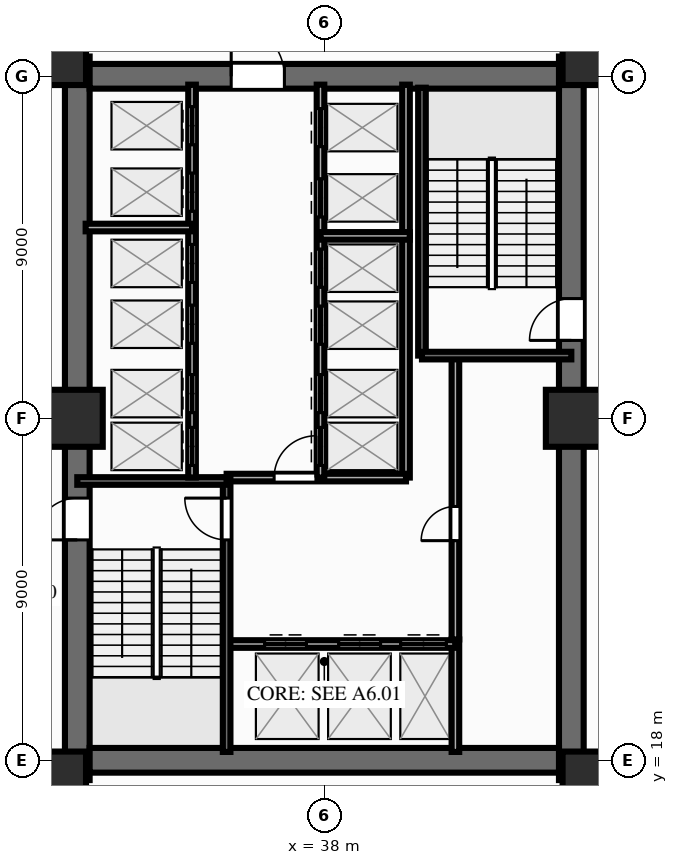
"""IFC4 building model, lengths in metres.
Left out: names, types, materials, properties, quantities, classifications, styles, units other than length and angle.
Written with IfcOpenShell. Run it as: python <this file> out.ifc"""

import sys

from ifc_helpers import new_model, si_unit, direction, frame, frame_2d, origin, origin_2d, place, context, subcontext, project, spatial, rectangle, extrude, source, transform, mapped, element, fill, save


model = new_model("IFC4")
c1 = context("Model", 3, precision=1e-05, world=origin(), true_north=direction((0.0, 1.0)))
c2 = subcontext(c1, "Body", "Model", "MODEL_VIEW")
j1 = project(units=[si_unit("LENGTHUNIT", "METRE"), si_unit("PLANEANGLEUNIT", "RADIAN")], contexts=[c1])
p1 = place(None, origin())
s1 = spatial("IfcSite", under=j1, at=p1, CompositionType="ELEMENT")
p2 = place(p1, origin())
s2 = spatial("IfcBuilding", under=s1, at=p2, CompositionType="ELEMENT")
p3 = place(p2, frame((0.0, 0.0, -9.2)))
s3 = spatial("IfcBuildingStorey", under=s2, at=p3, CompositionType="ELEMENT", Elevation=-9.2)
p4 = place(p3, frame((31.5, 17.48, 0.0), z_axis=(0.0, 0.0, 1.0), x_axis=(0.0, 1.0, 0.0)))
e1 = element("IfcWall", 1, at=p4, inside=s3, PredefinedType="SHEAR", context=c2, shape_type="SweptSolid", body=[
    extrude(rectangle(XDim=19.04, YDim=0.65, at=frame_2d((9.52, 0.0))), origin(), (0.0, 0.0, 1.0), 4.6),
])
p5 = place(p4, frame((6.32, 0.0, 0.0)))
e2 = element("IfcOpeningElement", 2, at=p5, cuts=e1, PredefinedType="OPENING", context=c2, shape_type="SweptSolid", body=[
    extrude(rectangle(XDim=1.1, YDim=2.15, at=frame_2d((0.55, 1.075))), frame((0.0, 0.337, 0.0), z_axis=(0.0, -1.0, 0.0), x_axis=(1.0, 0.0, 0.0)), (0.0, 0.0, 1.0), 0.674),
])
p6 = place(p3, frame((44.5, 17.48, 0.0), z_axis=(0.0, 0.0, 1.0), x_axis=(0.0, 1.0, 0.0)))
e3 = element("IfcWall", 3, at=p6, inside=s3, PredefinedType="SHEAR", context=c2, shape_type="SweptSolid", body=[
    extrude(rectangle(XDim=19.04, YDim=0.65, at=frame_2d((9.52, 0.0))), origin(), (0.0, 0.0, 1.0), 4.6),
])
p7 = place(p6, frame((12.67, 0.0, 0.0), z_axis=(0.0, 0.0, 1.0), x_axis=(-1.0, 0.0, 0.0)))
e4 = element("IfcOpeningElement", 4, at=p7, cuts=e3, PredefinedType="OPENING", context=c2, shape_type="SweptSolid", body=[
    extrude(rectangle(XDim=1.1, YDim=2.15, at=frame_2d((0.55, 1.075))), frame((0.0, 0.337, 0.0), z_axis=(0.0, -1.0, 0.0), x_axis=(1.0, 0.0, 0.0)), (0.0, 0.0, 1.0), 0.674),
])
p8 = place(p3, frame((31.825, 18.0, 0.0), z_axis=(0.0, 0.0, 1.0), x_axis=(1.0, 0.0, 0.0)))
e5 = element("IfcWall", 5, at=p8, inside=s3, PredefinedType="SHEAR", context=c2, shape_type="SweptSolid", body=[
    extrude(rectangle(XDim=12.35, YDim=0.65, at=frame_2d((6.175, 0.0))), origin(), (0.0, 0.0, 1.0), 4.6),
])
p9 = place(p3, frame((31.825, 36.0, 0.0), z_axis=(0.0, 0.0, 1.0), x_axis=(1.0, 0.0, 0.0)))
e6 = element("IfcWall", 6, at=p9, inside=s3, PredefinedType="SHEAR", context=c2, shape_type="SweptSolid", body=[
    extrude(rectangle(XDim=12.35, YDim=0.65, at=frame_2d((6.175, 0.0))), origin(), (0.0, 0.0, 1.0), 4.6),
])
p10 = place(p9, frame((5.125, 0.0, 0.0), z_axis=(0.0, 0.0, 1.0), x_axis=(-1.0, 0.0, 0.0)))
e7 = element("IfcOpeningElement", 7, at=p10, cuts=e6, PredefinedType="OPENING", context=c2, shape_type="SweptSolid", body=[
    extrude(rectangle(XDim=1.4, YDim=2.15, at=frame_2d((0.7, 1.075))), frame((0.0, 0.337, 0.0), z_axis=(0.0, -1.0, 0.0), x_axis=(1.0, 0.0, 0.0)), (0.0, 0.0, 1.0), 0.674),
])
m1 = source(origin(), c2, "Body", "SweptSolid", [
    extrude(rectangle(XDim=1.5, YDim=1.5, at=origin_2d()), origin(), (0.0, 0.0, 1.0), 4.6),
])
for number, where, z_axis, x_axis in (
    (8, (30.98, 17.48, 0.0), (0.0, 0.0, 1.0), (1.0, 0.0, 0.0)),
    (9, (45.02, 17.48, 0.0), (0.0, 0.0, 1.0), (1.0, 0.0, 0.0)),
    (10, (30.98, 36.52, 0.0), (0.0, 0.0, 1.0), (1.0, 0.0, 0.0)),
    (11, (45.02, 36.52, 0.0), (0.0, 0.0, 1.0), (1.0, 0.0, 0.0)),
    (12, (31.42, 27.0, 0.0), (0.0, 0.0, 1.0), (1.0, 0.0, 0.0)),
    (13, (44.58, 27.0, 0.0), (0.0, 0.0, 1.0), (1.0, 0.0, 0.0)),
):
    element("IfcColumn", number, at=place(p3, frame(where, z_axis=z_axis, x_axis=x_axis)), inside=s3, PredefinedType="COLUMN", context=c2, shape_type="MappedRepresentation", body=[
        mapped(m1, transform((0.0, 0.0, 0.0), scale=1.0)),
    ])
p11 = place(p3, frame((41.45, 18.22, 0.0), z_axis=(0.0, 0.0, 1.0), x_axis=(0.0, 1.0, 0.0)))
e14 = element("IfcWall", 14, at=p11, inside=s3, PredefinedType="PARTITIONING", context=c2, shape_type="SweptSolid", body=[
    extrude(rectangle(XDim=2.96, YDim=0.2, at=frame_2d((1.48, 0.0))), origin(), (0.0, 0.0, 1.0), 4.3),
])
p12 = place(p3, frame((41.45, 21.18, 0.0), z_axis=(0.0, 0.0, 1.0), x_axis=(0.0, 1.0, 0.0)))
e15 = element("IfcWall", 15, at=p12, inside=s3, PredefinedType="PARTITIONING", context=c2, shape_type="SweptSolid", body=[
    extrude(rectangle(XDim=7.42, YDim=0.2, at=frame_2d((3.71, 0.0))), origin(), (0.0, 0.0, 1.0), 4.3),
])
p13 = place(p12, frame((2.6, 0.0, 0.0)))
e16 = element("IfcOpeningElement", 16, at=p13, cuts=e15, PredefinedType="OPENING", context=c2, shape_type="SweptSolid", body=[
    extrude(rectangle(XDim=0.9, YDim=2.1, at=frame_2d((0.45, 1.05))), frame((0.0, 0.112, 0.0), z_axis=(0.0, -1.0, 0.0), x_axis=(1.0, 0.0, 0.0)), (0.0, 0.0, 1.0), 0.224),
])
p14 = place(p3, frame((40.15, 25.44, 0.0), z_axis=(0.0, 0.0, 1.0), x_axis=(0.0, 1.0, 0.0)))
e17 = element("IfcWall", 17, at=p14, inside=s3, PredefinedType="PARTITIONING", context=c2, shape_type="SweptSolid", body=[
    extrude(rectangle(XDim=6.36, YDim=0.2, at=frame_2d((3.18, 0.0))), origin(), (0.0, 0.0, 1.0), 4.3),
])
p15 = place(p3, frame((40.15, 31.8, 0.0), z_axis=(0.0, 0.0, 1.0), x_axis=(0.0, 1.0, 0.0)))
e18 = element("IfcWall", 18, at=p15, inside=s3, PredefinedType="PARTITIONING", context=c2, shape_type="SweptSolid", body=[
    extrude(rectangle(XDim=3.98, YDim=0.2, at=frame_2d((1.99, 0.0))), origin(), (0.0, 0.0, 1.0), 4.3),
])
p16 = place(p3, frame((35.43, 21.06, 0.0), z_axis=(0.0, 0.0, 1.0), x_axis=(1.0, 0.0, 0.0)))
e19 = element("IfcWall", 19, at=p16, inside=s3, PredefinedType="PARTITIONING", context=c2, shape_type="SweptSolid", body=[
    extrude(rectangle(XDim=6.02, YDim=0.2, at=frame_2d((3.01, 0.0))), origin(), (0.0, 0.0, 1.0), 4.3),
])
p17 = place(p16, frame((1.0, 0.0, 0.0)))
e20 = element("IfcOpeningElement", 20, at=p17, cuts=e19, PredefinedType="OPENING", context=c2, shape_type="SweptSolid", body=[
    extrude(rectangle(XDim=1.1, YDim=2.15, at=frame_2d((0.55, 1.075))), frame((0.0, 0.112, 0.0), z_axis=(0.0, -1.0, 0.0), x_axis=(1.0, 0.0, 0.0)), (0.0, 0.0, 1.0), 0.224),
])
p18 = place(p16, frame((2.95, 0.0, 0.0)))
e21 = element("IfcOpeningElement", 21, at=p18, cuts=e19, PredefinedType="OPENING", context=c2, shape_type="SweptSolid", body=[
    extrude(rectangle(XDim=1.1, YDim=2.15, at=frame_2d((0.55, 1.075))), frame((0.0, 0.112, 0.0), z_axis=(0.0, -1.0, 0.0), x_axis=(1.0, 0.0, 0.0)), (0.0, 0.0, 1.0), 0.224),
])
p19 = place(p16, frame((4.58, 0.0, 0.0)))
e22 = element("IfcOpeningElement", 22, at=p19, cuts=e19, PredefinedType="OPENING", context=c2, shape_type="SweptSolid", body=[
    extrude(rectangle(XDim=1.2, YDim=2.15, at=frame_2d((0.6, 1.075))), frame((0.0, 0.112, 0.0), z_axis=(0.0, -1.0, 0.0), x_axis=(1.0, 0.0, 0.0)), (0.0, 0.0, 1.0), 0.224),
])
p20 = place(p3, frame((35.43, 25.44, 0.0), z_axis=(0.0, 0.0, 1.0), x_axis=(1.0, 0.0, 0.0)))
e23 = element("IfcWall", 23, at=p20, inside=s3, PredefinedType="PARTITIONING", context=c2, shape_type="SweptSolid", body=[
    extrude(rectangle(XDim=4.72, YDim=0.2, at=frame_2d((2.36, 0.0))), origin(), (0.0, 0.0, 1.0), 4.3),
])
p21 = place(p20, frame((1.25, 0.0, 0.0)))
e24 = element("IfcOpeningElement", 24, at=p21, cuts=e23, PredefinedType="OPENING", context=c2, shape_type="SweptSolid", body=[
    extrude(rectangle(XDim=1.1, YDim=2.15, at=frame_2d((0.55, 1.075))), frame((0.0, 0.112, 0.0), z_axis=(0.0, -1.0, 0.0), x_axis=(1.0, 0.0, 0.0)), (0.0, 0.0, 1.0), 0.224),
])
p22 = place(p3, frame((35.43, 18.22, 0.0), z_axis=(0.0, 0.0, 1.0), x_axis=(0.0, 1.0, 0.0)))
e25 = element("IfcWall", 25, at=p22, inside=s3, PredefinedType="SOLIDWALL", context=c2, shape_type="SweptSolid", body=[
    extrude(rectangle(XDim=7.22, YDim=0.2, at=frame_2d((3.61, 0.0))), origin(), (0.0, 0.0, 1.0), 4.3),
])
p23 = place(p22, frame((6.68, 0.0, 0.0), z_axis=(0.0, 0.0, 1.0), x_axis=(-1.0, 0.0, 0.0)))
e26 = element("IfcOpeningElement", 26, at=p23, cuts=e25, PredefinedType="OPENING", context=c2, shape_type="SweptSolid", body=[
    extrude(rectangle(XDim=1.1, YDim=2.15, at=frame_2d((0.55, 1.075))), frame((0.0, 0.112, 0.0), z_axis=(0.0, -1.0, 0.0), x_axis=(1.0, 0.0, 0.0)), (0.0, 0.0, 1.0), 0.224),
])
p24 = place(p3, frame((31.5, 25.35, 0.0), z_axis=(0.0, 0.0, 1.0), x_axis=(1.0, 0.0, 0.0)))
e27 = element("IfcWall", 27, at=p24, inside=s3, PredefinedType="SOLIDWALL", context=c2, shape_type="SweptSolid", body=[
    extrude(rectangle(XDim=3.93, YDim=0.2, at=frame_2d((1.965, 0.0))), origin(), (0.0, 0.0, 1.0), 4.3),
])
p25 = place(p3, frame((40.57, 28.65, 0.0), z_axis=(0.0, 0.0, 1.0), x_axis=(0.0, 1.0, 0.0)))
e28 = element("IfcWall", 28, at=p25, inside=s3, PredefinedType="SOLIDWALL", context=c2, shape_type="SweptSolid", body=[
    extrude(rectangle(XDim=7.05, YDim=0.2, at=frame_2d((3.525, 0.0))), origin(), (0.0, 0.0, 1.0), 4.3),
])
p26 = place(p3, frame((40.57, 28.65, 0.0), z_axis=(0.0, 0.0, 1.0), x_axis=(1.0, 0.0, 0.0)))
e29 = element("IfcWall", 29, at=p26, inside=s3, PredefinedType="SOLIDWALL", context=c2, shape_type="SweptSolid", body=[
    extrude(rectangle(XDim=3.93, YDim=0.2, at=frame_2d((1.965, 0.0))), origin(), (0.0, 0.0, 1.0), 4.3),
])
p27 = place(p3, frame((34.52, 25.44, 0.0), z_axis=(0.0, 0.0, 1.0), x_axis=(0.0, 1.0, 0.0)))
e30 = element("IfcWall", 30, at=p27, inside=s3, PredefinedType="PARTITIONING", context=c2, shape_type="SweptSolid", body=[
    extrude(rectangle(XDim=10.34, YDim=0.2, at=frame_2d((5.17, 0.0))), origin(), (0.0, 0.0, 1.0), 4.3),
])
p28 = place(p27, frame((0.32, 0.0, 0.0)))
e31 = element("IfcOpeningElement", 31, at=p28, cuts=e30, PredefinedType="OPENING", context=c2, shape_type="SweptSolid", body=[
    extrude(rectangle(XDim=1.0, YDim=2.15, at=frame_2d((0.5, 1.075))), frame((0.0, 0.112, 0.0), z_axis=(0.0, -1.0, 0.0), x_axis=(1.0, 0.0, 0.0)), (0.0, 0.0, 1.0), 0.224),
])
p29 = place(p27, frame((1.71, 0.0, 0.0)))
e32 = element("IfcOpeningElement", 32, at=p29, cuts=e30, PredefinedType="OPENING", context=c2, shape_type="SweptSolid", body=[
    extrude(rectangle(XDim=1.0, YDim=2.15, at=frame_2d((0.5, 1.075))), frame((0.0, 0.112, 0.0), z_axis=(0.0, -1.0, 0.0), x_axis=(1.0, 0.0, 0.0)), (0.0, 0.0, 1.0), 0.224),
])
p30 = place(p27, frame((3.535, 0.0, 0.0)))
e33 = element("IfcOpeningElement", 33, at=p30, cuts=e30, PredefinedType="OPENING", context=c2, shape_type="SweptSolid", body=[
    extrude(rectangle(XDim=1.0, YDim=2.15, at=frame_2d((0.5, 1.075))), frame((0.0, 0.112, 0.0), z_axis=(0.0, -1.0, 0.0), x_axis=(1.0, 0.0, 0.0)), (0.0, 0.0, 1.0), 0.224),
])
p31 = place(p27, frame((5.135, 0.0, 0.0)))
e34 = element("IfcOpeningElement", 34, at=p31, cuts=e30, PredefinedType="OPENING", context=c2, shape_type="SweptSolid", body=[
    extrude(rectangle(XDim=1.0, YDim=2.15, at=frame_2d((0.5, 1.075))), frame((0.0, 0.112, 0.0), z_axis=(0.0, -1.0, 0.0), x_axis=(1.0, 0.0, 0.0)), (0.0, 0.0, 1.0), 0.224),
])
p32 = place(p27, frame((7.01, 0.0, 0.0)))
e35 = element("IfcOpeningElement", 35, at=p32, cuts=e30, PredefinedType="OPENING", context=c2, shape_type="SweptSolid", body=[
    extrude(rectangle(XDim=1.0, YDim=2.15, at=frame_2d((0.5, 1.075))), frame((0.0, 0.112, 0.0), z_axis=(0.0, -1.0, 0.0), x_axis=(1.0, 0.0, 0.0)), (0.0, 0.0, 1.0), 0.224),
])
p33 = place(p27, frame((8.76, 0.0, 0.0)))
e36 = element("IfcOpeningElement", 36, at=p33, cuts=e30, PredefinedType="OPENING", context=c2, shape_type="SweptSolid", body=[
    extrude(rectangle(XDim=1.0, YDim=2.15, at=frame_2d((0.5, 1.075))), frame((0.0, 0.112, 0.0), z_axis=(0.0, -1.0, 0.0), x_axis=(1.0, 0.0, 0.0)), (0.0, 0.0, 1.0), 0.224),
])
p34 = place(p3, frame((31.72, 32.02, 0.0), z_axis=(0.0, 0.0, 1.0), x_axis=(1.0, 0.0, 0.0)))
e37 = element("IfcWall", 37, at=p34, inside=s3, PredefinedType="PARTITIONING", context=c2, shape_type="SweptSolid", body=[
    extrude(rectangle(XDim=2.8, YDim=0.2, at=frame_2d((1.4, 0.0))), origin(), (0.0, 0.0, 1.0), 4.3),
])
p35 = place(p3, frame((37.9, 25.44, 0.0), z_axis=(0.0, 0.0, 1.0), x_axis=(0.0, 1.0, 0.0)))
e38 = element("IfcWall", 38, at=p35, inside=s3, PredefinedType="PARTITIONING", context=c2, shape_type="SweptSolid", body=[
    extrude(rectangle(XDim=10.34, YDim=0.2, at=frame_2d((5.17, 0.0))), origin(), (0.0, 0.0, 1.0), 4.3),
])
p36 = place(p35, frame((0.32, 0.0, 0.0)))
e39 = element("IfcOpeningElement", 39, at=p36, cuts=e38, PredefinedType="OPENING", context=c2, shape_type="SweptSolid", body=[
    extrude(rectangle(XDim=1.0, YDim=2.15, at=frame_2d((0.5, 1.075))), frame((0.0, 0.112, 0.0), z_axis=(0.0, -1.0, 0.0), x_axis=(1.0, 0.0, 0.0)), (0.0, 0.0, 1.0), 0.224),
])
p37 = place(p35, frame((1.71, 0.0, 0.0)))
e40 = element("IfcOpeningElement", 40, at=p37, cuts=e38, PredefinedType="OPENING", context=c2, shape_type="SweptSolid", body=[
    extrude(rectangle(XDim=1.0, YDim=2.15, at=frame_2d((0.5, 1.075))), frame((0.0, 0.112, 0.0), z_axis=(0.0, -1.0, 0.0), x_axis=(1.0, 0.0, 0.0)), (0.0, 0.0, 1.0), 0.224),
])
p38 = place(p35, frame((3.51, 0.0, 0.0)))
e41 = element("IfcOpeningElement", 41, at=p38, cuts=e38, PredefinedType="OPENING", context=c2, shape_type="SweptSolid", body=[
    extrude(rectangle(XDim=1.0, YDim=2.15, at=frame_2d((0.5, 1.075))), frame((0.0, 0.112, 0.0), z_axis=(0.0, -1.0, 0.0), x_axis=(1.0, 0.0, 0.0)), (0.0, 0.0, 1.0), 0.224),
])
p39 = place(p35, frame((5.01, 0.0, 0.0)))
e42 = element("IfcOpeningElement", 42, at=p39, cuts=e38, PredefinedType="OPENING", context=c2, shape_type="SweptSolid", body=[
    extrude(rectangle(XDim=1.0, YDim=2.15, at=frame_2d((0.5, 1.075))), frame((0.0, 0.112, 0.0), z_axis=(0.0, -1.0, 0.0), x_axis=(1.0, 0.0, 0.0)), (0.0, 0.0, 1.0), 0.224),
])
p40 = place(p35, frame((6.86, 0.0, 0.0)))
e43 = element("IfcOpeningElement", 43, at=p40, cuts=e38, PredefinedType="OPENING", context=c2, shape_type="SweptSolid", body=[
    extrude(rectangle(XDim=1.0, YDim=2.15, at=frame_2d((0.5, 1.075))), frame((0.0, 0.112, 0.0), z_axis=(0.0, -1.0, 0.0), x_axis=(1.0, 0.0, 0.0)), (0.0, 0.0, 1.0), 0.224),
])
p41 = place(p35, frame((8.71, 0.0, 0.0)))
e44 = element("IfcOpeningElement", 44, at=p41, cuts=e38, PredefinedType="OPENING", context=c2, shape_type="SweptSolid", body=[
    extrude(rectangle(XDim=1.0, YDim=2.15, at=frame_2d((0.5, 1.075))), frame((0.0, 0.112, 0.0), z_axis=(0.0, -1.0, 0.0), x_axis=(1.0, 0.0, 0.0)), (0.0, 0.0, 1.0), 0.224),
])
p42 = place(p3, frame((37.9, 31.8, 0.0), z_axis=(0.0, 0.0, 1.0), x_axis=(1.0, 0.0, 0.0)))
e45 = element("IfcWall", 45, at=p42, inside=s3, PredefinedType="PARTITIONING", context=c2, shape_type="SweptSolid", body=[
    extrude(rectangle(XDim=2.35, YDim=0.2, at=frame_2d((1.175, 0.0))), origin(), (0.0, 0.0, 1.0), 4.3),
])
m2 = source(origin(), c2, "Body", "SweptSolid", [
    extrude(rectangle(XDim=1.1, YDim=2.15, at=frame_2d((0.55, 1.075))), frame((0.0, 0.025, 0.0), z_axis=(0.0, -1.0, 0.0), x_axis=(1.0, 0.0, 0.0)), (0.0, 0.0, 1.0), 0.05),
])
p43 = place(p5, origin())
e46 = element("IfcDoor", 46, at=p43, inside=s3, OperationType="SINGLE_SWING_LEFT", PredefinedType="DOOR", context=c2, shape_type="MappedRepresentation", body=[
    mapped(m2, transform((0.0, 0.0, 0.0), scale=1.0)),
])
fill(e2, e46)
p44 = place(p7, origin())
e47 = element("IfcDoor", 47, at=p44, inside=s3, OperationType="SINGLE_SWING_RIGHT", PredefinedType="DOOR", context=c2, shape_type="MappedRepresentation", body=[
    mapped(m2, transform((0.0, 0.0, 0.0), scale=1.0)),
])
fill(e4, e47)
m3 = source(origin(), c2, "Body", "SweptSolid", [
    extrude(rectangle(XDim=1.4, YDim=2.15, at=frame_2d((0.7, 1.075))), frame((0.0, 0.025, 0.0), z_axis=(0.0, -1.0, 0.0), x_axis=(1.0, 0.0, 0.0)), (0.0, 0.0, 1.0), 0.05),
])
p45 = place(p10, origin())
e48 = element("IfcDoor", 48, at=p45, inside=s3, OperationType="SINGLE_SWING_RIGHT", PredefinedType="DOOR", context=c2, shape_type="MappedRepresentation", body=[
    mapped(m3, transform((0.0, 0.0, 0.0), scale=1.0)),
])
fill(e7, e48)
m4 = source(origin(), c2, "Body", "SweptSolid", [
    extrude(rectangle(XDim=0.9, YDim=2.1, at=frame_2d((0.45, 1.05))), frame((0.0, 0.025, 0.0), z_axis=(0.0, -1.0, 0.0), x_axis=(1.0, 0.0, 0.0)), (0.0, 0.0, 1.0), 0.05),
])
p46 = place(p13, origin())
e49 = element("IfcDoor", 49, at=p46, inside=s3, OperationType="SINGLE_SWING_LEFT", PredefinedType="DOOR", context=c2, shape_type="MappedRepresentation", body=[
    mapped(m4, transform((0.0, 0.0, 0.0), scale=1.0)),
])
fill(e16, e49)
p47 = place(p17, origin())
e50 = element("IfcDoor", 50, at=p47, inside=s3, OperationType="DOUBLE_DOOR_SLIDING", PredefinedType="DOOR", context=c2, shape_type="MappedRepresentation", body=[
    mapped(m2, transform((0.0, 0.0, 0.0), scale=1.0)),
])
fill(e20, e50)
p48 = place(p18, origin())
e51 = element("IfcDoor", 51, at=p48, inside=s3, OperationType="DOUBLE_DOOR_SLIDING", PredefinedType="DOOR", context=c2, shape_type="MappedRepresentation", body=[
    mapped(m2, transform((0.0, 0.0, 0.0), scale=1.0)),
])
fill(e21, e51)
m5 = source(origin(), c2, "Body", "SweptSolid", [
    extrude(rectangle(XDim=1.2, YDim=2.15, at=frame_2d((0.6, 1.075))), frame((0.0, 0.025, 0.0), z_axis=(0.0, -1.0, 0.0), x_axis=(1.0, 0.0, 0.0)), (0.0, 0.0, 1.0), 0.05),
])
p49 = place(p19, origin())
e52 = element("IfcDoor", 52, at=p49, inside=s3, OperationType="DOUBLE_DOOR_SLIDING", PredefinedType="DOOR", context=c2, shape_type="MappedRepresentation", body=[
    mapped(m5, transform((0.0, 0.0, 0.0), scale=1.0)),
])
fill(e22, e52)
p50 = place(p21, origin())
e53 = element("IfcDoor", 53, at=p50, inside=s3, OperationType="SINGLE_SWING_RIGHT", PredefinedType="DOOR", context=c2, shape_type="MappedRepresentation", body=[
    mapped(m2, transform((0.0, 0.0, 0.0), scale=1.0)),
])
fill(e24, e53)
p51 = place(p23, origin())
e54 = element("IfcDoor", 54, at=p51, inside=s3, OperationType="SINGLE_SWING_LEFT", PredefinedType="DOOR", context=c2, shape_type="MappedRepresentation", body=[
    mapped(m2, transform((0.0, 0.0, 0.0), scale=1.0)),
])
fill(e26, e54)
m6 = source(origin(), c2, "Body", "SweptSolid", [
    extrude(rectangle(XDim=1.0, YDim=2.15, at=frame_2d((0.5, 1.075))), frame((0.0, 0.025, 0.0), z_axis=(0.0, -1.0, 0.0), x_axis=(1.0, 0.0, 0.0)), (0.0, 0.0, 1.0), 0.05),
])
p52 = place(p28, origin())
e55 = element("IfcDoor", 55, at=p52, inside=s3, OperationType="DOUBLE_DOOR_SLIDING", PredefinedType="DOOR", context=c2, shape_type="MappedRepresentation", body=[
    mapped(m6, transform((0.0, 0.0, 0.0), scale=1.0)),
])
fill(e31, e55)
p53 = place(p29, origin())
e56 = element("IfcDoor", 56, at=p53, inside=s3, OperationType="DOUBLE_DOOR_SLIDING", PredefinedType="DOOR", context=c2, shape_type="MappedRepresentation", body=[
    mapped(m6, transform((0.0, 0.0, 0.0), scale=1.0)),
])
fill(e32, e56)
p54 = place(p30, origin())
e57 = element("IfcDoor", 57, at=p54, inside=s3, OperationType="DOUBLE_DOOR_SLIDING", PredefinedType="DOOR", context=c2, shape_type="MappedRepresentation", body=[
    mapped(m6, transform((0.0, 0.0, 0.0), scale=1.0)),
])
fill(e33, e57)
p55 = place(p31, origin())
e58 = element("IfcDoor", 58, at=p55, inside=s3, OperationType="DOUBLE_DOOR_SLIDING", PredefinedType="DOOR", context=c2, shape_type="MappedRepresentation", body=[
    mapped(m6, transform((0.0, 0.0, 0.0), scale=1.0)),
])
fill(e34, e58)
p56 = place(p32, origin())
e59 = element("IfcDoor", 59, at=p56, inside=s3, OperationType="DOUBLE_DOOR_SLIDING", PredefinedType="DOOR", context=c2, shape_type="MappedRepresentation", body=[
    mapped(m6, transform((0.0, 0.0, 0.0), scale=1.0)),
])
fill(e35, e59)
p57 = place(p33, origin())
e60 = element("IfcDoor", 60, at=p57, inside=s3, OperationType="DOUBLE_DOOR_SLIDING", PredefinedType="DOOR", context=c2, shape_type="MappedRepresentation", body=[
    mapped(m6, transform((0.0, 0.0, 0.0), scale=1.0)),
])
fill(e36, e60)
p58 = place(p36, origin())
e61 = element("IfcDoor", 61, at=p58, inside=s3, OperationType="DOUBLE_DOOR_SLIDING", PredefinedType="DOOR", context=c2, shape_type="MappedRepresentation", body=[
    mapped(m6, transform((0.0, 0.0, 0.0), scale=1.0)),
])
fill(e39, e61)
p59 = place(p37, origin())
e62 = element("IfcDoor", 62, at=p59, inside=s3, OperationType="DOUBLE_DOOR_SLIDING", PredefinedType="DOOR", context=c2, shape_type="MappedRepresentation", body=[
    mapped(m6, transform((0.0, 0.0, 0.0), scale=1.0)),
])
fill(e40, e62)
p60 = place(p38, origin())
e63 = element("IfcDoor", 63, at=p60, inside=s3, OperationType="DOUBLE_DOOR_SLIDING", PredefinedType="DOOR", context=c2, shape_type="MappedRepresentation", body=[
    mapped(m6, transform((0.0, 0.0, 0.0), scale=1.0)),
])
fill(e41, e63)
p61 = place(p39, origin())
e64 = element("IfcDoor", 64, at=p61, inside=s3, OperationType="DOUBLE_DOOR_SLIDING", PredefinedType="DOOR", context=c2, shape_type="MappedRepresentation", body=[
    mapped(m6, transform((0.0, 0.0, 0.0), scale=1.0)),
])
fill(e42, e64)
p62 = place(p40, origin())
e65 = element("IfcDoor", 65, at=p62, inside=s3, OperationType="DOUBLE_DOOR_SLIDING", PredefinedType="DOOR", context=c2, shape_type="MappedRepresentation", body=[
    mapped(m6, transform((0.0, 0.0, 0.0), scale=1.0)),
])
fill(e43, e65)
p63 = place(p41, origin())
e66 = element("IfcDoor", 66, at=p63, inside=s3, OperationType="DOUBLE_DOOR_SLIDING", PredefinedType="DOOR", context=c2, shape_type="MappedRepresentation", body=[
    mapped(m6, transform((0.0, 0.0, 0.0), scale=1.0)),
])
fill(e44, e66)
save(model, sys.argv[1])
